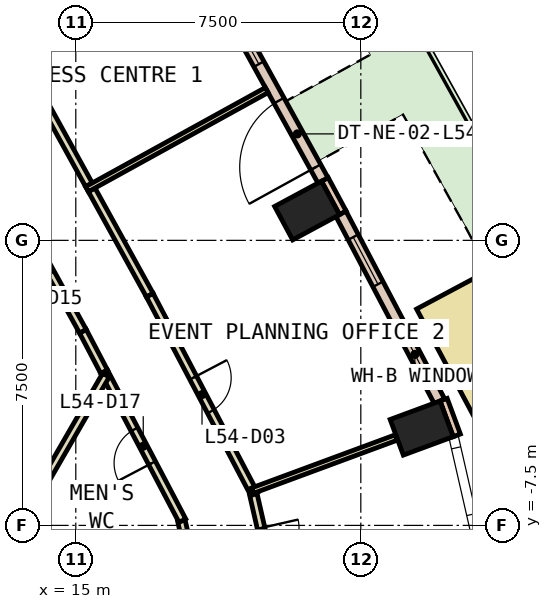
"""IFC4 building model, lengths in metres.
Left out: names, types, materials, properties, quantities, classifications, styles, units other than length and angle.
Written with IfcOpenShell. Run it as: python <this file> out.ifc"""

import sys

from ifc_helpers import new_model, si_unit, direction, frame, frame_2d, origin, origin_2d, place, context, subcontext, project, spatial, rectangle, extrude, element, fill, save


model = new_model("IFC4")
c1 = context("Model", 3, precision=1e-05, world=origin(), true_north=direction((0.0, 1.0)))
c2 = subcontext(c1, "Body", "Model", "MODEL_VIEW")
j1 = project(units=[si_unit("LENGTHUNIT", "METRE"), si_unit("PLANEANGLEUNIT", "RADIAN")], contexts=[c1])
p1 = place(None, origin())
s1 = spatial("IfcSite", under=j1, at=p1, CompositionType="ELEMENT")
p2 = place(p1, origin())
s2 = spatial("IfcBuilding", under=s1, at=p2, CompositionType="ELEMENT")
p3 = place(p2, frame((0.0, 0.0, 241.4)))
s3 = spatial("IfcBuildingStorey", under=s2, at=p3, CompositionType="ELEMENT", Elevation=241.4)
for number, where, z_axis, x_axis in (
    (1, (24.102, -4.939, 0.0), (0.0, 0.0, 1.0), (-0.347, 0.938, 0.0)),
    (2, (21.086, 0.784, 0.0), (0.0, 0.0, 1.0), (-0.474, 0.881, 0.0)),
):
    element("IfcColumn", number, at=place(p3, frame(where, z_axis=z_axis, x_axis=x_axis)), inside=s3, PredefinedType="COLUMN", context=c2, shape_type="SweptSolid", body=[
        extrude(rectangle(XDim=1.0, YDim=1.4, at=origin_2d()), origin(), (0.0, 0.0, 1.0), 3.26),
    ])
p4 = place(p3, frame((7.578, -4.375, -0.6), z_axis=(0.0, 0.0, 1.0), x_axis=(0.866024315419, -0.5000018851, 0.0)))
e3 = element("IfcWall", 3, at=p4, inside=s3, PredefinedType="SHEAR", context=c2, shape_type="SweptSolid", body=[
    extrude(rectangle(XDim=9.0, YDim=0.8, at=frame_2d((4.5, 0.0))), origin(), (0.0, 0.0, 1.0), 3.86),
])
p5 = place(p3, frame((25.026, -5.131, 0.0), z_axis=(0.0, 0.0, 1.0), x_axis=(-0.346892928577, 0.937904737222, 0.0)))
e4 = element("IfcWall", 4, at=p5, inside=s3, PredefinedType="STANDARD", context=c2, shape_type="SweptSolid", body=[
    extrude(rectangle(XDim=1.0, YDim=0.2, at=frame_2d((0.5, 0.0))), origin(), (0.0, 0.0, 1.0), 3.26),
])
p6 = place(p3, frame((22.027, 0.723, 0.0), z_axis=(0.0, 0.0, 1.0), x_axis=(-0.473852444207, 0.880604259085, 0.0)))
e5 = element("IfcWall", 5, at=p6, inside=s3, PredefinedType="STANDARD", context=c2, shape_type="SweptSolid", body=[
    extrude(rectangle(XDim=1.0, YDim=0.2, at=frame_2d((0.5, 0.0))), origin(), (0.0, 0.0, 1.0), 3.26),
])
p7 = place(p3, frame((24.57, -4.234, 0.0), z_axis=(0.0, 0.0, 1.0), x_axis=(-0.465228032148, 0.885190871001, 0.0)))
e6 = element("IfcWall", 6, at=p7, inside=s3, PredefinedType="STANDARD", context=c2, shape_type="SweptSolid", body=[
    extrude(rectangle(XDim=5.572, YDim=0.3, at=frame_2d((2.786, 0.0))), origin(), (0.0, 0.0, 1.0), 3.26),
])
p8 = place(p7, frame((0.693, 0.0, 0.9)))
e7 = element("IfcOpeningElement", 7, at=p8, cuts=e6, PredefinedType="OPENING", context=c2, shape_type="SweptSolid", body=[
    extrude(rectangle(XDim=1.4, YDim=2.0, at=frame_2d((0.7, 1.0))), frame((0.0, 0.16, 0.0), z_axis=(0.0, -1.0, 0.0), x_axis=(1.0, 0.0, 0.0)), (0.0, 0.0, 1.0), 0.32),
])
p9 = place(p7, frame((3.479, 0.0, 0.9)))
e8 = element("IfcOpeningElement", 8, at=p9, cuts=e6, PredefinedType="OPENING", context=c2, shape_type="SweptSolid", body=[
    extrude(rectangle(XDim=1.4, YDim=2.0, at=frame_2d((0.7, 1.0))), frame((0.0, 0.16, 0.0), z_axis=(0.0, -1.0, 0.0), x_axis=(1.0, 0.0, 0.0)), (0.0, 0.0, 1.0), 0.32),
])
p10 = place(p3, frame((21.505, 1.577, 0.0), z_axis=(0.0, 0.0, 1.0), x_axis=(-0.482734585173, 0.875766704253, 0.0)))
e9 = element("IfcWall", 9, at=p10, inside=s3, PredefinedType="STANDARD", context=c2, shape_type="SweptSolid", body=[
    extrude(rectangle(XDim=5.593, YDim=0.3, at=frame_2d((2.796, 0.0))), origin(), (0.0, 0.0, 1.0), 3.26),
])
p11 = place(p10, frame((0.398, 0.0, 0.0)))
e10 = element("IfcOpeningElement", 10, at=p11, cuts=e9, PredefinedType="OPENING", context=c2, shape_type="SweptSolid", body=[
    extrude(rectangle(XDim=2.0, YDim=2.4, at=frame_2d((1.0, 1.2))), frame((0.0, 0.16, 0.0), z_axis=(0.0, -1.0, 0.0), x_axis=(1.0, 0.0, 0.0)), (0.0, 0.0, 1.0), 0.32),
])
p12 = place(p10, frame((3.495, 0.0, 0.9)))
e11 = element("IfcOpeningElement", 11, at=p12, cuts=e9, PredefinedType="OPENING", context=c2, shape_type="SweptSolid", body=[
    extrude(rectangle(XDim=1.4, YDim=2.0, at=frame_2d((0.7, 1.0))), frame((0.0, 0.16, 0.0), z_axis=(0.0, -1.0, 0.0), x_axis=(1.0, 0.0, 0.0)), (0.0, 0.0, 1.0), 0.32),
])
p13 = place(p3, frame((27.604, -6.606, 0.0), z_axis=(0.0, 0.0, 1.0), x_axis=(-0.470628729942, 0.882331342837, 0.0)))
e12 = element("IfcWall", 12, at=p13, inside=s3, PredefinedType="STANDARD", context=c2, shape_type="SweptSolid", body=[
    extrude(rectangle(XDim=5.946, YDim=1.9, at=frame_2d((2.973, 0.0))), origin(), (0.0, 0.0, 1.0), 0.8),
])
p14 = place(p3, frame((15.746, -3.458, 0.0), z_axis=(0.0, 0.0, 1.0), x_axis=(-0.464794189951, 0.885418748948, 0.0)))
e13 = element("IfcWall", 13, at=p14, inside=s3, PredefinedType="PARTITIONING", context=c2, shape_type="SweptSolid", body=[
    extrude(rectangle(XDim=1.205, YDim=0.2, at=frame_2d((0.603, 0.0))), origin(), (0.0, 0.0, 1.0), 3.26),
])
p15 = place(p3, frame((15.186, -2.391, 0.0), z_axis=(0.0, 0.0, 1.0), x_axis=(-0.482858240592, 0.875698532311, 0.0)))
e14 = element("IfcWall", 14, at=p15, inside=s3, PredefinedType="PARTITIONING", context=c2, shape_type="SweptSolid", body=[
    extrude(rectangle(XDim=4.478, YDim=0.2, at=frame_2d((2.239, 0.0))), origin(), (0.0, 0.0, 1.0), 3.26),
])
p16 = place(p15, frame((1.739, 0.0, 0.0)))
e15 = element("IfcOpeningElement", 15, at=p16, cuts=e14, PredefinedType="OPENING", context=c2, shape_type="SweptSolid", body=[
    extrude(rectangle(XDim=1.0, YDim=2.1, at=frame_2d((0.5, 1.05))), frame((0.0, 0.11, 0.0), z_axis=(0.0, -1.0, 0.0), x_axis=(1.0, 0.0, 0.0)), (0.0, 0.0, 1.0), 0.22),
])
p17 = place(p3, frame((18.236, -9.379, 0.0), z_axis=(0.0, 0.0, 1.0), x_axis=(-0.222760041204, 0.974873306662, 0.0)))
e16 = element("IfcWall", 16, at=p17, inside=s3, PredefinedType="PARTITIONING", context=c2, shape_type="SweptSolid", body=[
    extrude(rectangle(XDim=2.047, YDim=0.2, at=frame_2d((1.024, 0.0))), origin(), (0.0, 0.0, 1.0), 3.26),
])
p18 = place(p3, frame((17.804, -7.374, 0.0), z_axis=(0.0, 0.0, 1.0), x_axis=(-0.465179971699, 0.885216128372, 0.0)))
e17 = element("IfcWall", 17, at=p18, inside=s3, PredefinedType="PARTITIONING", context=c2, shape_type="SweptSolid", body=[
    extrude(rectangle(XDim=4.424, YDim=0.2, at=frame_2d((2.212, 0.0))), origin(), (0.0, 0.0, 1.0), 3.26),
])
p19 = place(p18, frame((1.712, 0.0, 0.0)))
e18 = element("IfcOpeningElement", 18, at=p19, cuts=e17, PredefinedType="OPENING", context=c2, shape_type="SweptSolid", body=[
    extrude(rectangle(XDim=1.0, YDim=2.1, at=frame_2d((0.5, 1.05))), frame((0.0, 0.11, 0.0), z_axis=(0.0, -1.0, 0.0), x_axis=(1.0, 0.0, 0.0)), (0.0, 0.0, 1.0), 0.22),
])
p20 = place(p3, frame((19.672, -6.683, 0.0), z_axis=(0.0, 0.0, 1.0), x_axis=(0.222523624687, -0.974927298036, 0.0)))
e19 = element("IfcWall", 19, at=p20, inside=s3, PredefinedType="PARTITIONING", context=c2, shape_type="SweptSolid", body=[
    extrude(rectangle(XDim=2.817, YDim=0.2, at=frame_2d((1.409, 0.0))), origin(), (0.0, 0.0, 1.0), 3.26),
])
p21 = place(p20, frame((0.909, 0.0, 0.0)))
e20 = element("IfcOpeningElement", 20, at=p21, cuts=e19, PredefinedType="OPENING", context=c2, shape_type="SweptSolid", body=[
    extrude(rectangle(XDim=1.0, YDim=2.1, at=frame_2d((0.5, 1.05))), frame((0.0, 0.11, 0.0), z_axis=(0.0, -1.0, 0.0), x_axis=(1.0, 0.0, 0.0)), (0.0, 0.0, 1.0), 0.22),
])
p22 = place(p3, frame((15.418, 1.33, 0.0), z_axis=(0.0, 0.0, 1.0), x_axis=(0.482838875149, -0.875709210095, 0.0)))
e21 = element("IfcWall", 21, at=p22, inside=s3, PredefinedType="PARTITIONING", context=c2, shape_type="SweptSolid", body=[
    extrude(rectangle(XDim=3.167, YDim=0.2, at=frame_2d((1.583, 0.0))), origin(), (0.0, 0.0, 1.0), 3.26),
])
p23 = place(p3, frame((16.947, -1.443, 0.0), z_axis=(0.0, 0.0, 1.0), x_axis=(0.465133414481, -0.88524059257, 0.0)))
e22 = element("IfcWall", 22, at=p23, inside=s3, PredefinedType="PARTITIONING", context=c2, shape_type="SweptSolid", body=[
    extrude(rectangle(XDim=5.91, YDim=0.2, at=frame_2d((2.955, 0.0))), origin(), (0.0, 0.0, 1.0), 3.26),
])
p24 = place(p23, frame((2.455, 0.0, 0.0)))
e23 = element("IfcOpeningElement", 23, at=p24, cuts=e22, PredefinedType="OPENING", context=c2, shape_type="SweptSolid", body=[
    extrude(rectangle(XDim=1.0, YDim=2.1, at=frame_2d((0.5, 1.05))), frame((0.0, 0.11, 0.0), z_axis=(0.0, -1.0, 0.0), x_axis=(1.0, 0.0, 0.0)), (0.0, 0.0, 1.0), 0.22),
])
p25 = place(p3, frame((13.817, 4.234, 0.0), z_axis=(0.0, 0.0, 1.0), x_axis=(0.482871474341, -0.875691235121, 0.0)))
e24 = element("IfcWall", 24, at=p25, inside=s3, PredefinedType="PARTITIONING", context=c2, shape_type="SweptSolid", body=[
    extrude(rectangle(XDim=3.167, YDim=0.2, at=frame_2d((1.583, 0.0))), origin(), (0.0, 0.0, 1.0), 3.26),
])
p26 = place(p3, frame((15.793, -3.546, 0.0), z_axis=(0.0, 0.0, 1.0), x_axis=(-0.500000064182, -0.866025366729, 0.0)))
e25 = element("IfcWall", 25, at=p26, inside=s3, PredefinedType="PARTITIONING", context=c2, shape_type="SweptSolid", body=[
    extrude(rectangle(XDim=4.06, YDim=0.2, at=frame_2d((2.03, 0.0))), origin(), (0.0, 0.0, 1.0), 3.26),
])
p27 = place(p3, frame((19.649, -6.586, 0.0), z_axis=(0.0, 0.0, 1.0), x_axis=(0.937935790958, 0.346808956114, 0.0)))
e26 = element("IfcWall", 26, at=p27, inside=s3, PredefinedType="PARTITIONING", context=c2, shape_type="SweptSolid", body=[
    extrude(rectangle(XDim=4.028, YDim=0.15, at=frame_2d((2.014, 0.0))), origin(), (0.0, 0.0, 1.0), 3.26),
])
p28 = place(p3, frame((15.295, 1.347, 0.0), z_axis=(0.0, 0.0, 1.0), x_axis=(0.875728645362, 0.482803624358, 0.0)))
e27 = element("IfcWall", 27, at=p28, inside=s3, PredefinedType="PARTITIONING", context=c2, shape_type="SweptSolid", body=[
    extrude(rectangle(XDim=5.4, YDim=0.15, at=frame_2d((2.7, 0.0))), origin(), (0.0, 0.0, 1.0), 3.26),
])
p29 = place(p8, origin())
e28 = element("IfcWindow", 28, at=p29, inside=s3, PartitioningType="SINGLE_PANEL", PredefinedType="WINDOW", context=c2, shape_type="SweptSolid", body=[
    extrude(rectangle(XDim=1.4, YDim=2.0, at=frame_2d((0.7, 1.0))), frame((0.0, 0.03, 0.0), z_axis=(0.0, -1.0, 0.0), x_axis=(1.0, 0.0, 0.0)), (0.0, 0.0, 1.0), 0.06),
])
fill(e7, e28)
p30 = place(p9, origin())
e29 = element("IfcWindow", 29, at=p30, inside=s3, PartitioningType="SINGLE_PANEL", PredefinedType="WINDOW", context=c2, shape_type="SweptSolid", body=[
    extrude(rectangle(XDim=1.4, YDim=2.0, at=frame_2d((0.7, 1.0))), frame((0.0, 0.03, 0.0), z_axis=(0.0, -1.0, 0.0), x_axis=(1.0, 0.0, 0.0)), (0.0, 0.0, 1.0), 0.06),
])
fill(e8, e29)
p31 = place(p11, origin())
e30 = element("IfcDoor", 30, at=p31, inside=s3, OperationType="SLIDING_TO_LEFT", PredefinedType="DOOR", context=c2, shape_type="SweptSolid", body=[
    extrude(rectangle(XDim=2.0, YDim=2.4, at=frame_2d((1.0, 1.2))), frame((0.0, 0.025, 0.0), z_axis=(0.0, -1.0, 0.0), x_axis=(1.0, 0.0, 0.0)), (0.0, 0.0, 1.0), 0.05),
])
fill(e10, e30)
p32 = place(p12, origin())
e31 = element("IfcWindow", 31, at=p32, inside=s3, PartitioningType="SINGLE_PANEL", PredefinedType="WINDOW", context=c2, shape_type="SweptSolid", body=[
    extrude(rectangle(XDim=1.4, YDim=2.0, at=frame_2d((0.7, 1.0))), frame((0.0, 0.03, 0.0), z_axis=(0.0, -1.0, 0.0), x_axis=(1.0, 0.0, 0.0)), (0.0, 0.0, 1.0), 0.06),
])
fill(e11, e31)
p33 = place(p21, origin())
e32 = element("IfcDoor", 32, at=p33, inside=s3, OperationType="SINGLE_SWING_LEFT", PredefinedType="DOOR", context=c2, shape_type="SweptSolid", body=[
    extrude(rectangle(XDim=1.0, YDim=2.1, at=frame_2d((0.5, 1.05))), frame((0.0, 0.025, 0.0), z_axis=(0.0, -1.0, 0.0), x_axis=(1.0, 0.0, 0.0)), (0.0, 0.0, 1.0), 0.05),
])
fill(e20, e32)
p34 = place(p24, origin())
e33 = element("IfcDoor", 33, at=p34, inside=s3, OperationType="SINGLE_SWING_LEFT", PredefinedType="DOOR", context=c2, shape_type="SweptSolid", body=[
    extrude(rectangle(XDim=1.0, YDim=2.1, at=frame_2d((0.5, 1.05))), frame((0.0, 0.025, 0.0), z_axis=(0.0, -1.0, 0.0), x_axis=(1.0, 0.0, 0.0)), (0.0, 0.0, 1.0), 0.05),
])
fill(e23, e33)
p35 = place(p19, origin())
e34 = element("IfcDoor", 34, at=p35, inside=s3, OperationType="SINGLE_SWING_LEFT", PredefinedType="DOOR", context=c2, shape_type="SweptSolid", body=[
    extrude(rectangle(XDim=1.0, YDim=2.1, at=frame_2d((0.5, 1.05))), frame((0.0, 0.025, 0.0), z_axis=(0.0, -1.0, 0.0), x_axis=(1.0, 0.0, 0.0)), (0.0, 0.0, 1.0), 0.05),
])
fill(e18, e34)
save(model, sys.argv[1])
